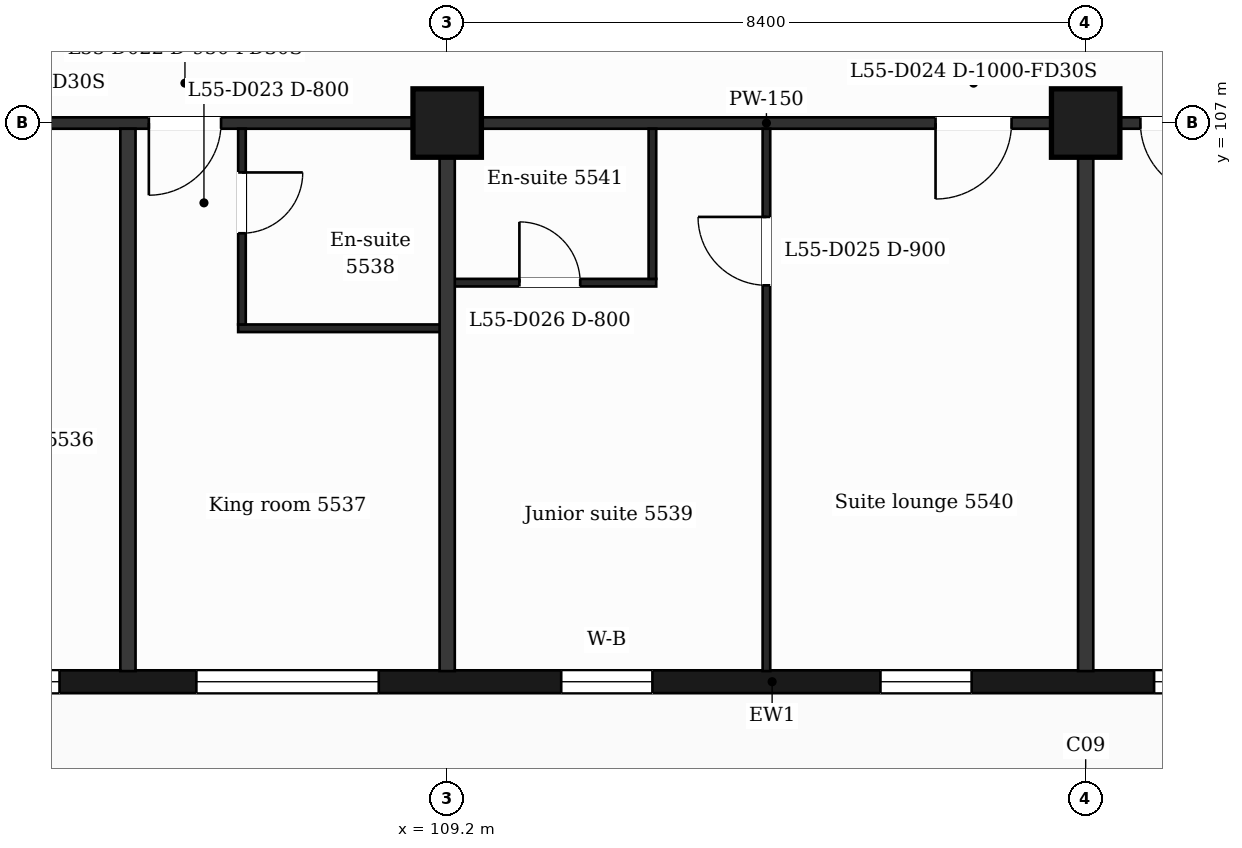
"""IFC4 building model, lengths in metres.
Left out: names, types, materials, properties, quantities, classifications, styles, units other than length and angle.
Written with IfcOpenShell. Run it as: python <this file> out.ifc"""

import sys

from ifc_helpers import new_model, si_unit, direction, frame, frame_2d, origin, origin_2d, place, context, subcontext, project, spatial, rectangle, extrude, element, fill, save


model = new_model("IFC4")
c1 = context("Model", 3, precision=1e-05, world=origin(), true_north=direction((0.0, 1.0)))
c2 = subcontext(c1, "Body", "Model", "MODEL_VIEW")
j1 = project(units=[si_unit("LENGTHUNIT", "METRE"), si_unit("PLANEANGLEUNIT", "RADIAN")], contexts=[c1])
p1 = place(None, origin())
s1 = spatial("IfcSite", under=j1, at=p1, CompositionType="ELEMENT")
p2 = place(p1, origin())
s2 = spatial("IfcBuilding", under=s1, at=p2, CompositionType="ELEMENT")
p3 = place(p2, frame((0.0, 0.0, 228.1)))
s3 = spatial("IfcBuildingStorey", under=s2, at=p3, CompositionType="ELEMENT", Elevation=228.1)
for number, where, z_axis, x_axis in (
    (1, (109.2, 107.0, 0.0), (0.0, 0.0, 1.0), (1.0, 0.0, 0.0)),
    (2, (117.6, 107.0, 0.0), (0.0, 0.0, 1.0), (1.0, 0.0, 0.0)),
):
    element("IfcColumn", number, at=place(p3, frame(where, z_axis=z_axis, x_axis=x_axis)), inside=s3, PredefinedType="COLUMN", context=c2, shape_type="SweptSolid", body=[
        extrude(rectangle(XDim=0.9, YDim=0.9, at=origin_2d()), origin(), (0.0, 0.0, 1.0), 3.7),
    ])
p4 = place(p3, frame((89.85, 99.65, 0.0), z_axis=(0.0, 0.0, 1.0), x_axis=(1.0, 0.0, 0.0)))
e3 = element("IfcWall", 3, at=p4, inside=s3, PredefinedType="SOLIDWALL", context=c2, shape_type="SweptSolid", body=[
    extrude(rectangle(XDim=47.25, YDim=0.3, at=frame_2d((23.625, 0.0))), origin(), (0.0, 0.0, 1.0), 3.38),
])
p5 = place(p4, frame((0.725, 0.0, 0.9)))
e4 = element("IfcOpeningElement", 4, at=p5, cuts=e3, PredefinedType="OPENING", context=c2, shape_type="SweptSolid", body=[
    extrude(rectangle(XDim=1.2, YDim=2.1, at=frame_2d((0.6, 1.05))), frame((0.0, 0.16, 0.0), z_axis=(0.0, -1.0, 0.0), x_axis=(1.0, 0.0, 0.0)), (0.0, 0.0, 1.0), 0.32),
])
p6 = place(p4, frame((3.45, 0.0, 0.9)))
e5 = element("IfcOpeningElement", 5, at=p6, cuts=e3, PredefinedType="OPENING", context=c2, shape_type="SweptSolid", body=[
    extrude(rectangle(XDim=2.4, YDim=2.1, at=frame_2d((1.2, 1.05))), frame((0.0, 0.16, 0.0), z_axis=(0.0, -1.0, 0.0), x_axis=(1.0, 0.0, 0.0)), (0.0, 0.0, 1.0), 0.32),
])
p7 = place(p4, frame((7.35, 0.0, 0.0)))
e6 = element("IfcOpeningElement", 6, at=p7, cuts=e3, PredefinedType="OPENING", context=c2, shape_type="SweptSolid", body=[
    extrude(rectangle(XDim=1.2, YDim=2.4, at=frame_2d((0.6, 1.2))), frame((0.0, 0.16, 0.0), z_axis=(0.0, -1.0, 0.0), x_axis=(1.0, 0.0, 0.0)), (0.0, 0.0, 1.0), 0.32),
])
p8 = place(p4, frame((9.15, 0.0, 0.9)))
e7 = element("IfcOpeningElement", 7, at=p8, cuts=e3, PredefinedType="OPENING", context=c2, shape_type="SweptSolid", body=[
    extrude(rectangle(XDim=1.2, YDim=2.1, at=frame_2d((0.6, 1.05))), frame((0.0, 0.16, 0.0), z_axis=(0.0, -1.0, 0.0), x_axis=(1.0, 0.0, 0.0)), (0.0, 0.0, 1.0), 0.32),
])
p9 = place(p4, frame((11.85, 0.0, 0.9)))
e8 = element("IfcOpeningElement", 8, at=p9, cuts=e3, PredefinedType="OPENING", context=c2, shape_type="SweptSolid", body=[
    extrude(rectangle(XDim=2.4, YDim=2.1, at=frame_2d((1.2, 1.05))), frame((0.0, 0.16, 0.0), z_axis=(0.0, -1.0, 0.0), x_axis=(1.0, 0.0, 0.0)), (0.0, 0.0, 1.0), 0.32),
])
p10 = place(p4, frame((16.05, 0.0, 0.9)))
e9 = element("IfcOpeningElement", 9, at=p10, cuts=e3, PredefinedType="OPENING", context=c2, shape_type="SweptSolid", body=[
    extrude(rectangle(XDim=2.4, YDim=2.1, at=frame_2d((1.2, 1.05))), frame((0.0, 0.16, 0.0), z_axis=(0.0, -1.0, 0.0), x_axis=(1.0, 0.0, 0.0)), (0.0, 0.0, 1.0), 0.32),
])
p11 = place(p4, frame((20.85, 0.0, 0.9)))
e10 = element("IfcOpeningElement", 10, at=p11, cuts=e3, PredefinedType="OPENING", context=c2, shape_type="SweptSolid", body=[
    extrude(rectangle(XDim=1.2, YDim=2.1, at=frame_2d((0.6, 1.05))), frame((0.0, 0.16, 0.0), z_axis=(0.0, -1.0, 0.0), x_axis=(1.0, 0.0, 0.0)), (0.0, 0.0, 1.0), 0.32),
])
p12 = place(p4, frame((25.05, 0.0, 0.9)))
e11 = element("IfcOpeningElement", 11, at=p12, cuts=e3, PredefinedType="OPENING", context=c2, shape_type="SweptSolid", body=[
    extrude(rectangle(XDim=1.2, YDim=2.1, at=frame_2d((0.6, 1.05))), frame((0.0, 0.16, 0.0), z_axis=(0.0, -1.0, 0.0), x_axis=(1.0, 0.0, 0.0)), (0.0, 0.0, 1.0), 0.32),
])
p13 = place(p4, frame((28.65, 0.0, 0.9)))
e12 = element("IfcOpeningElement", 12, at=p13, cuts=e3, PredefinedType="OPENING", context=c2, shape_type="SweptSolid", body=[
    extrude(rectangle(XDim=2.4, YDim=2.1, at=frame_2d((1.2, 1.05))), frame((0.0, 0.16, 0.0), z_axis=(0.0, -1.0, 0.0), x_axis=(1.0, 0.0, 0.0)), (0.0, 0.0, 1.0), 0.32),
])
p14 = place(p4, frame((32.85, 0.0, 0.9)))
e13 = element("IfcOpeningElement", 13, at=p14, cuts=e3, PredefinedType="OPENING", context=c2, shape_type="SweptSolid", body=[
    extrude(rectangle(XDim=2.4, YDim=2.1, at=frame_2d((1.2, 1.05))), frame((0.0, 0.16, 0.0), z_axis=(0.0, -1.0, 0.0), x_axis=(1.0, 0.0, 0.0)), (0.0, 0.0, 1.0), 0.32),
])
p15 = place(p4, frame((37.05, 0.0, 0.9)))
e14 = element("IfcOpeningElement", 14, at=p15, cuts=e3, PredefinedType="OPENING", context=c2, shape_type="SweptSolid", body=[
    extrude(rectangle(XDim=2.4, YDim=2.1, at=frame_2d((1.2, 1.05))), frame((0.0, 0.16, 0.0), z_axis=(0.0, -1.0, 0.0), x_axis=(1.0, 0.0, 0.0)), (0.0, 0.0, 1.0), 0.32),
])
p16 = place(p4, frame((41.25, 0.0, 0.9)))
e15 = element("IfcOpeningElement", 15, at=p16, cuts=e3, PredefinedType="OPENING", context=c2, shape_type="SweptSolid", body=[
    extrude(rectangle(XDim=2.4, YDim=2.1, at=frame_2d((1.2, 1.05))), frame((0.0, 0.16, 0.0), z_axis=(0.0, -1.0, 0.0), x_axis=(1.0, 0.0, 0.0)), (0.0, 0.0, 1.0), 0.32),
])
p17 = place(p4, frame((45.25, 0.0, 0.9)))
e16 = element("IfcOpeningElement", 16, at=p17, cuts=e3, PredefinedType="OPENING", context=c2, shape_type="SweptSolid", body=[
    extrude(rectangle(XDim=1.2, YDim=2.1, at=frame_2d((0.6, 1.05))), frame((0.0, 0.16, 0.0), z_axis=(0.0, -1.0, 0.0), x_axis=(1.0, 0.0, 0.0)), (0.0, 0.0, 1.0), 0.32),
])
p18 = place(p3, frame((106.45, 104.3, 0.0), z_axis=(0.0, 0.0, 1.0), x_axis=(1.0, 0.0, 0.0)))
e17 = element("IfcWall", 17, at=p18, inside=s3, PredefinedType="PARTITIONING", context=c2, shape_type="SweptSolid", body=[
    extrude(rectangle(XDim=2.75, YDim=0.1, at=frame_2d((1.375, 0.0))), origin(), (0.0, 0.0, 1.0), 3.38),
])
p19 = place(p3, frame((109.2, 104.9, 0.0), z_axis=(0.0, 0.0, 1.0), x_axis=(1.0, 0.0, 0.0)))
e18 = element("IfcWall", 18, at=p19, inside=s3, PredefinedType="PARTITIONING", context=c2, shape_type="SweptSolid", body=[
    extrude(rectangle(XDim=2.75, YDim=0.1, at=frame_2d((1.375, 0.0))), origin(), (0.0, 0.0, 1.0), 3.38),
])
p20 = place(p19, frame((0.95, 0.0, 0.0)))
e19 = element("IfcOpeningElement", 19, at=p20, cuts=e18, PredefinedType="OPENING", context=c2, shape_type="SweptSolid", body=[
    extrude(rectangle(XDim=0.8, YDim=2.1, at=frame_2d((0.4, 1.05))), frame((0.0, 0.06, 0.0), z_axis=(0.0, -1.0, 0.0), x_axis=(1.0, 0.0, 0.0)), (0.0, 0.0, 1.0), 0.12),
])
p21 = place(p3, frame((87.018, 107.0, 0.0), z_axis=(0.0, 0.0, 1.0), x_axis=(1.0, 0.0, 0.0)))
e20 = element("IfcWall", 20, at=p21, inside=s3, PredefinedType="PARTITIONING", context=c2, shape_type="SweptSolid", body=[
    extrude(rectangle(XDim=52.765, YDim=0.15, at=frame_2d((26.382, 0.0))), origin(), (0.0, 0.0, 1.0), 3.38),
])
p22 = place(p21, frame((0.707, 0.0, 0.0)))
e21 = element("IfcOpeningElement", 21, at=p22, cuts=e20, PredefinedType="OPENING", context=c2, shape_type="SweptSolid", body=[
    extrude(rectangle(XDim=0.95, YDim=2.1, at=frame_2d((0.475, 1.05))), frame((0.0, 0.085, 0.0), z_axis=(0.0, -1.0, 0.0), x_axis=(1.0, 0.0, 0.0)), (0.0, 0.0, 1.0), 0.17),
])
p23 = place(p21, frame((6.894, 0.0, 0.0)))
e22 = element("IfcOpeningElement", 22, at=p23, cuts=e20, PredefinedType="OPENING", context=c2, shape_type="SweptSolid", body=[
    extrude(rectangle(XDim=0.95, YDim=2.1, at=frame_2d((0.475, 1.05))), frame((0.0, 0.085, 0.0), z_axis=(0.0, -1.0, 0.0), x_axis=(1.0, 0.0, 0.0)), (0.0, 0.0, 1.0), 0.17),
])
p24 = place(p21, frame((15.662, 0.0, 0.0)))
e23 = element("IfcOpeningElement", 23, at=p24, cuts=e20, PredefinedType="OPENING", context=c2, shape_type="SweptSolid", body=[
    extrude(rectangle(XDim=0.95, YDim=2.1, at=frame_2d((0.475, 1.05))), frame((0.0, 0.085, 0.0), z_axis=(0.0, -1.0, 0.0), x_axis=(1.0, 0.0, 0.0)), (0.0, 0.0, 1.0), 0.17),
])
p25 = place(p21, frame((18.257, 0.0, 0.0)))
e24 = element("IfcOpeningElement", 24, at=p25, cuts=e20, PredefinedType="OPENING", context=c2, shape_type="SweptSolid", body=[
    extrude(rectangle(XDim=0.95, YDim=2.1, at=frame_2d((0.475, 1.05))), frame((0.0, 0.085, 0.0), z_axis=(0.0, -1.0, 0.0), x_axis=(1.0, 0.0, 0.0)), (0.0, 0.0, 1.0), 0.17),
])
p26 = place(p21, frame((28.607, 0.0, 0.0)))
e25 = element("IfcOpeningElement", 25, at=p26, cuts=e20, PredefinedType="OPENING", context=c2, shape_type="SweptSolid", body=[
    extrude(rectangle(XDim=1.0, YDim=2.1, at=frame_2d((0.5, 1.05))), frame((0.0, 0.085, 0.0), z_axis=(0.0, -1.0, 0.0), x_axis=(1.0, 0.0, 0.0)), (0.0, 0.0, 1.0), 0.17),
])
p27 = place(p21, frame((31.302, 0.0, 0.0)))
e26 = element("IfcOpeningElement", 26, at=p27, cuts=e20, PredefinedType="OPENING", context=c2, shape_type="SweptSolid", body=[
    extrude(rectangle(XDim=0.95, YDim=2.1, at=frame_2d((0.475, 1.05))), frame((0.0, 0.085, 0.0), z_axis=(0.0, -1.0, 0.0), x_axis=(1.0, 0.0, 0.0)), (0.0, 0.0, 1.0), 0.17),
])
p28 = place(p21, frame((35.057, 0.0, 0.0)))
e27 = element("IfcOpeningElement", 27, at=p28, cuts=e20, PredefinedType="OPENING", context=c2, shape_type="SweptSolid", body=[
    extrude(rectangle(XDim=0.95, YDim=2.1, at=frame_2d((0.475, 1.05))), frame((0.0, 0.085, 0.0), z_axis=(0.0, -1.0, 0.0), x_axis=(1.0, 0.0, 0.0)), (0.0, 0.0, 1.0), 0.17),
])
p29 = place(p21, frame((41.957, 0.0, 0.0)))
e28 = element("IfcOpeningElement", 28, at=p29, cuts=e20, PredefinedType="OPENING", context=c2, shape_type="SweptSolid", body=[
    extrude(rectangle(XDim=0.95, YDim=2.1, at=frame_2d((0.475, 1.05))), frame((0.0, 0.085, 0.0), z_axis=(0.0, -1.0, 0.0), x_axis=(1.0, 0.0, 0.0)), (0.0, 0.0, 1.0), 0.17),
])
p30 = place(p21, frame((45.712, 0.0, 0.0)))
e29 = element("IfcOpeningElement", 29, at=p30, cuts=e20, PredefinedType="OPENING", context=c2, shape_type="SweptSolid", body=[
    extrude(rectangle(XDim=1.0, YDim=2.1, at=frame_2d((0.5, 1.05))), frame((0.0, 0.085, 0.0), z_axis=(0.0, -1.0, 0.0), x_axis=(1.0, 0.0, 0.0)), (0.0, 0.0, 1.0), 0.17),
])
p31 = place(p21, frame((48.974, 0.0, 0.0)))
e30 = element("IfcOpeningElement", 30, at=p31, cuts=e20, PredefinedType="OPENING", context=c2, shape_type="SweptSolid", body=[
    extrude(rectangle(XDim=0.95, YDim=2.1, at=frame_2d((0.475, 1.05))), frame((0.0, 0.085, 0.0), z_axis=(0.0, -1.0, 0.0), x_axis=(1.0, 0.0, 0.0)), (0.0, 0.0, 1.0), 0.17),
])
p32 = place(p3, frame((105.0, 99.79, 0.0), z_axis=(0.0, 0.0, 1.0), x_axis=(0.0, 1.0, 0.0)))
e31 = element("IfcWall", 31, at=p32, inside=s3, PredefinedType="PARTITIONING", context=c2, shape_type="SweptSolid", body=[
    extrude(rectangle(XDim=7.135, YDim=0.2, at=frame_2d((3.567, 0.0))), origin(), (0.0, 0.0, 1.0), 3.38),
])
p33 = place(p3, frame((106.5, 104.35, 0.0), z_axis=(0.0, 0.0, 1.0), x_axis=(0.0, 1.0, 0.0)))
e32 = element("IfcWall", 32, at=p33, inside=s3, PredefinedType="PARTITIONING", context=c2, shape_type="SweptSolid", body=[
    extrude(rectangle(XDim=2.575, YDim=0.1, at=frame_2d((1.288, 0.0))), origin(), (0.0, 0.0, 1.0), 3.38),
])
p34 = place(p33, frame((1.2, 0.0, 0.0)))
e33 = element("IfcOpeningElement", 33, at=p34, cuts=e32, PredefinedType="OPENING", context=c2, shape_type="SweptSolid", body=[
    extrude(rectangle(XDim=0.8, YDim=2.1, at=frame_2d((0.4, 1.05))), frame((0.0, 0.06, 0.0), z_axis=(0.0, -1.0, 0.0), x_axis=(1.0, 0.0, 0.0)), (0.0, 0.0, 1.0), 0.12),
])
p35 = place(p3, frame((109.2, 99.79, 0.0), z_axis=(0.0, 0.0, 1.0), x_axis=(0.0, 1.0, 0.0)))
e34 = element("IfcWall", 34, at=p35, inside=s3, PredefinedType="PARTITIONING", context=c2, shape_type="SweptSolid", body=[
    extrude(rectangle(XDim=7.135, YDim=0.2, at=frame_2d((3.567, 0.0))), origin(), (0.0, 0.0, 1.0), 3.38),
])
p36 = place(p3, frame((111.9, 104.95, 0.0), z_axis=(0.0, 0.0, 1.0), x_axis=(0.0, 1.0, 0.0)))
e35 = element("IfcWall", 35, at=p36, inside=s3, PredefinedType="PARTITIONING", context=c2, shape_type="SweptSolid", body=[
    extrude(rectangle(XDim=1.975, YDim=0.1, at=frame_2d((0.988, 0.0))), origin(), (0.0, 0.0, 1.0), 3.38),
])
p37 = place(p3, frame((113.4, 99.79, 0.0), z_axis=(0.0, 0.0, 1.0), x_axis=(0.0, 1.0, 0.0)))
e36 = element("IfcWall", 36, at=p37, inside=s3, PredefinedType="PARTITIONING", context=c2, shape_type="SweptSolid", body=[
    extrude(rectangle(XDim=7.135, YDim=0.1, at=frame_2d((3.567, 0.0))), origin(), (0.0, 0.0, 1.0), 3.38),
])
p38 = place(p37, frame((5.075, 0.0, 0.0)))
e37 = element("IfcOpeningElement", 37, at=p38, cuts=e36, PredefinedType="OPENING", context=c2, shape_type="SweptSolid", body=[
    extrude(rectangle(XDim=0.9, YDim=2.1, at=frame_2d((0.45, 1.05))), frame((0.0, 0.06, 0.0), z_axis=(0.0, -1.0, 0.0), x_axis=(1.0, 0.0, 0.0)), (0.0, 0.0, 1.0), 0.12),
])
p39 = place(p3, frame((117.6, 99.79, 0.0), z_axis=(0.0, 0.0, 1.0), x_axis=(0.0, 1.0, 0.0)))
e38 = element("IfcWall", 38, at=p39, inside=s3, PredefinedType="PARTITIONING", context=c2, shape_type="SweptSolid", body=[
    extrude(rectangle(XDim=7.135, YDim=0.2, at=frame_2d((3.567, 0.0))), origin(), (0.0, 0.0, 1.0), 3.38),
])
p40 = place(p9, origin())
e39 = element("IfcWindow", 39, at=p40, inside=s3, PartitioningType="SINGLE_PANEL", PredefinedType="WINDOW", context=c2, shape_type="SweptSolid", body=[
    extrude(rectangle(XDim=2.4, YDim=2.1, at=frame_2d((1.2, 1.05))), frame((0.0, 0.03, 0.0), z_axis=(0.0, -1.0, 0.0), x_axis=(1.0, 0.0, 0.0)), (0.0, 0.0, 1.0), 0.06),
])
fill(e8, e39)
p41 = place(p10, origin())
e40 = element("IfcWindow", 40, at=p41, inside=s3, PartitioningType="SINGLE_PANEL", PredefinedType="WINDOW", context=c2, shape_type="SweptSolid", body=[
    extrude(rectangle(XDim=2.4, YDim=2.1, at=frame_2d((1.2, 1.05))), frame((0.0, 0.03, 0.0), z_axis=(0.0, -1.0, 0.0), x_axis=(1.0, 0.0, 0.0)), (0.0, 0.0, 1.0), 0.06),
])
fill(e9, e40)
p42 = place(p11, origin())
e41 = element("IfcWindow", 41, at=p42, inside=s3, PartitioningType="SINGLE_PANEL", PredefinedType="WINDOW", context=c2, shape_type="SweptSolid", body=[
    extrude(rectangle(XDim=1.2, YDim=2.1, at=frame_2d((0.6, 1.05))), frame((0.0, 0.03, 0.0), z_axis=(0.0, -1.0, 0.0), x_axis=(1.0, 0.0, 0.0)), (0.0, 0.0, 1.0), 0.06),
])
fill(e10, e41)
p43 = place(p12, origin())
e42 = element("IfcWindow", 42, at=p43, inside=s3, PartitioningType="SINGLE_PANEL", PredefinedType="WINDOW", context=c2, shape_type="SweptSolid", body=[
    extrude(rectangle(XDim=1.2, YDim=2.1, at=frame_2d((0.6, 1.05))), frame((0.0, 0.03, 0.0), z_axis=(0.0, -1.0, 0.0), x_axis=(1.0, 0.0, 0.0)), (0.0, 0.0, 1.0), 0.06),
])
fill(e11, e42)
p44 = place(p13, origin())
e43 = element("IfcWindow", 43, at=p44, inside=s3, PartitioningType="SINGLE_PANEL", PredefinedType="WINDOW", context=c2, shape_type="SweptSolid", body=[
    extrude(rectangle(XDim=2.4, YDim=2.1, at=frame_2d((1.2, 1.05))), frame((0.0, 0.03, 0.0), z_axis=(0.0, -1.0, 0.0), x_axis=(1.0, 0.0, 0.0)), (0.0, 0.0, 1.0), 0.06),
])
fill(e12, e43)
p45 = place(p25, origin())
e44 = element("IfcDoor", 44, at=p45, inside=s3, OperationType="SINGLE_SWING_LEFT", PredefinedType="DOOR", context=c2, shape_type="SweptSolid", body=[
    extrude(rectangle(XDim=0.95, YDim=2.1, at=frame_2d((0.475, 1.05))), frame((0.0, 0.025, 0.0), z_axis=(0.0, -1.0, 0.0), x_axis=(1.0, 0.0, 0.0)), (0.0, 0.0, 1.0), 0.05),
])
fill(e24, e44)
p46 = place(p34, origin())
e45 = element("IfcDoor", 45, at=p46, inside=s3, OperationType="SINGLE_SWING_RIGHT", PredefinedType="DOOR", context=c2, shape_type="SweptSolid", body=[
    extrude(rectangle(XDim=0.8, YDim=2.1, at=frame_2d((0.4, 1.05))), frame((0.0, 0.025, 0.0), z_axis=(0.0, -1.0, 0.0), x_axis=(1.0, 0.0, 0.0)), (0.0, 0.0, 1.0), 0.05),
])
fill(e33, e45)
p47 = place(p26, origin())
e46 = element("IfcDoor", 46, at=p47, inside=s3, OperationType="SINGLE_SWING_LEFT", PredefinedType="DOOR", context=c2, shape_type="SweptSolid", body=[
    extrude(rectangle(XDim=1.0, YDim=2.1, at=frame_2d((0.5, 1.05))), frame((0.0, 0.025, 0.0), z_axis=(0.0, -1.0, 0.0), x_axis=(1.0, 0.0, 0.0)), (0.0, 0.0, 1.0), 0.05),
])
fill(e25, e46)
p48 = place(p38, origin())
e47 = element("IfcDoor", 47, at=p48, inside=s3, OperationType="SINGLE_SWING_RIGHT", PredefinedType="DOOR", context=c2, shape_type="SweptSolid", body=[
    extrude(rectangle(XDim=0.9, YDim=2.1, at=frame_2d((0.45, 1.05))), frame((0.0, 0.025, 0.0), z_axis=(0.0, -1.0, 0.0), x_axis=(1.0, 0.0, 0.0)), (0.0, 0.0, 1.0), 0.05),
])
fill(e37, e47)
p49 = place(p20, origin())
e48 = element("IfcDoor", 48, at=p49, inside=s3, OperationType="SINGLE_SWING_LEFT", PredefinedType="DOOR", context=c2, shape_type="SweptSolid", body=[
    extrude(rectangle(XDim=0.8, YDim=2.1, at=frame_2d((0.4, 1.05))), frame((0.0, 0.025, 0.0), z_axis=(0.0, -1.0, 0.0), x_axis=(1.0, 0.0, 0.0)), (0.0, 0.0, 1.0), 0.05),
])
fill(e19, e48)
p50 = place(p27, origin())
e49 = element("IfcDoor", 49, at=p50, inside=s3, OperationType="SINGLE_SWING_RIGHT", PredefinedType="DOOR", context=c2, shape_type="SweptSolid", body=[
    extrude(rectangle(XDim=0.95, YDim=2.1, at=frame_2d((0.475, 1.05))), frame((0.0, 0.025, 0.0), z_axis=(0.0, -1.0, 0.0), x_axis=(1.0, 0.0, 0.0)), (0.0, 0.0, 1.0), 0.05),
])
fill(e26, e49)
save(model, sys.argv[1])
